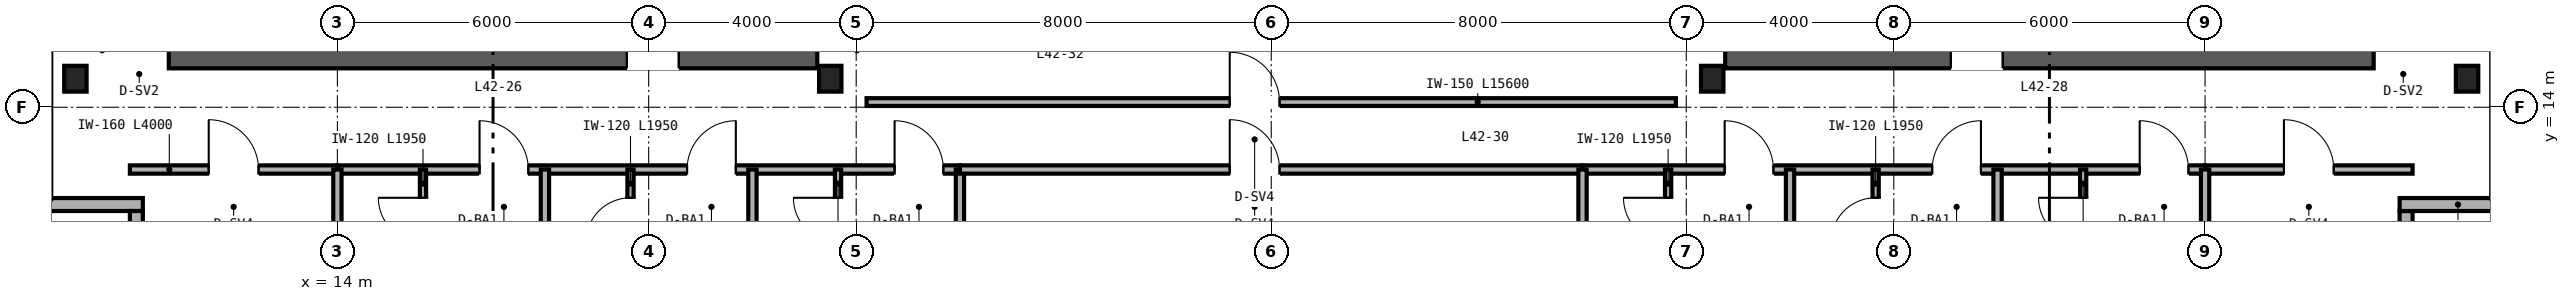
"""IFC4 building model, lengths in metres.
Left out: names, types, materials, properties, quantities, classifications, styles, units other than length and angle.
Written with IfcOpenShell. Run it as: python <this file> out.ifc"""

import sys

from ifc_helpers import new_model, si_unit, direction, frame, frame_2d, origin, origin_2d, place, context, subcontext, project, spatial, rectangle, i_section, extrude, source, transform, mapped, element, fill, save


model = new_model("IFC4")
c1 = context("Model", 3, precision=1e-05, world=origin(), true_north=direction((0.0, 1.0)))
c2 = subcontext(c1, "Body", "Model", "MODEL_VIEW")
j1 = project(units=[si_unit("LENGTHUNIT", "METRE"), si_unit("PLANEANGLEUNIT", "RADIAN")], contexts=[c1])
p1 = place(None, origin())
s1 = spatial("IfcSite", under=j1, at=p1, CompositionType="ELEMENT")
p2 = place(p1, origin())
s2 = spatial("IfcBuilding", under=s1, at=p2, CompositionType="ELEMENT")
p3 = place(p2, frame((0.0, 0.0, 170.4)))
s3 = spatial("IfcBuildingStorey", under=s2, at=p3, CompositionType="ELEMENT", Elevation=170.4)
p4 = place(p3, frame((10.75, 15.0, 0.0), z_axis=(0.0, 0.0, 1.0), x_axis=(1.0, 0.0, 0.0)))
e1 = element("IfcWall", 1, at=p4, inside=s3, PredefinedType="SHEAR", context=c2, shape_type="SweptSolid", body=[
    extrude(rectangle(XDim=12.5, YDim=0.5, at=frame_2d((6.25, 0.0))), origin(), (0.0, 0.0, 1.0), 3.37),
])
p5 = place(p4, frame((8.83, 0.0, 0.0)))
e2 = element("IfcOpeningElement", 2, at=p5, cuts=e1, PredefinedType="OPENING", context=c2, shape_type="SweptSolid", body=[
    extrude(rectangle(XDim=1.0, YDim=2.15, at=frame_2d((0.5, 1.075))), frame((0.0, 0.26, 0.0), z_axis=(0.0, -1.0, 0.0), x_axis=(1.0, 0.0, 0.0)), (0.0, 0.0, 1.0), 0.52),
])
p6 = place(p3, frame((40.75, 15.0, 0.0), z_axis=(0.0, 0.0, 1.0), x_axis=(1.0, 0.0, 0.0)))
e3 = element("IfcWall", 3, at=p6, inside=s3, PredefinedType="SHEAR", context=c2, shape_type="SweptSolid", body=[
    extrude(rectangle(XDim=12.5, YDim=0.5, at=frame_2d((6.25, 0.0))), origin(), (0.0, 0.0, 1.0), 3.37),
])
p7 = place(p6, frame((4.35, 0.0, 0.0)))
e4 = element("IfcOpeningElement", 4, at=p7, cuts=e3, PredefinedType="OPENING", context=c2, shape_type="SweptSolid", body=[
    extrude(rectangle(XDim=1.0, YDim=2.15, at=frame_2d((0.5, 1.075))), frame((0.0, 0.26, 0.0), z_axis=(0.0, -1.0, 0.0), x_axis=(1.0, 0.0, 0.0)), (0.0, 0.0, 1.0), 0.52),
])
m1 = source(origin(), c2, "Body", "SweptSolid", [
    extrude(i_section(OverallWidth=0.432, OverallDepth=0.498, WebThickness=0.056, FlangeThickness=0.089, FilletRadius=0.025, at=origin_2d()), origin(), (0.0, 0.0, 1.0), 3.37),
])
for number, where, z_axis, x_axis in (
    (5, (8.95, 14.55, 0.0), (0.0, 0.0, 1.0), (1.0, 0.0, 0.0)),
    (6, (23.5, 14.55, 0.0), (0.0, 0.0, 1.0), (1.0, 0.0, 0.0)),
    (7, (40.5, 14.55, 0.0), (0.0, 0.0, 1.0), (1.0, 0.0, 0.0)),
    (8, (55.05, 14.55, 0.0), (0.0, 0.0, 1.0), (1.0, 0.0, 0.0)),
):
    element("IfcColumn", number, at=place(p3, frame(where, z_axis=z_axis, x_axis=x_axis)), inside=s3, PredefinedType="COLUMN", context=c2, shape_type="MappedRepresentation", body=[
        mapped(m1, transform((0.0, 0.0, 0.0), scale=1.0)),
    ])
p8 = place(p3, frame((53.875, 10.0, 0.0), z_axis=(0.0, 0.0, 1.0), x_axis=(0.0, 1.0, 0.0)))
e9 = element("IfcWall", 9, at=p8, inside=s3, PredefinedType="SOLIDWALL", context=c2, shape_type="SweptSolid", body=[
    extrude(rectangle(XDim=2.0, YDim=0.25, at=frame_2d((1.0, 0.0))), origin(), (0.0, 0.0, 1.0), 3.37),
])
for number, where, z_axis, x_axis in (
    (10, (53.75, 12.125, 0.0), (0.0, 0.0, 1.0), (1.0, 0.0, 0.0)),
    (11, (8.0, 12.125, 0.0), (0.0, 0.0, 1.0), (1.0, 0.0, 0.0)),
):
    element("IfcWall", number, at=place(p3, frame(where, z_axis=z_axis, x_axis=x_axis)), inside=s3, PredefinedType="SOLIDWALL", context=c2, shape_type="SweptSolid", body=[
        extrude(rectangle(XDim=2.25, YDim=0.25, at=frame_2d((1.125, 0.0))), origin(), (0.0, 0.0, 1.0), 3.37),
    ])
p9 = place(p3, frame((10.125, 12.0, 0.0), z_axis=(0.0, 0.0, 1.0), x_axis=(0.0, -1.0, 0.0)))
e12 = element("IfcWall", 12, at=p9, inside=s3, PredefinedType="SOLIDWALL", context=c2, shape_type="SweptSolid", body=[
    extrude(rectangle(XDim=2.0, YDim=0.25, at=frame_2d((1.0, 0.0))), origin(), (0.0, 0.0, 1.0), 3.37),
])
p10 = place(p3, frame((24.2, 14.1, 0.0), z_axis=(0.0, 0.0, 1.0), x_axis=(1.0, 0.0, 0.0)))
e13 = element("IfcWall", 13, at=p10, inside=s3, PredefinedType="PARTITIONING", context=c2, shape_type="SweptSolid", body=[
    extrude(rectangle(XDim=15.6, YDim=0.15, at=frame_2d((7.8, 0.0))), origin(), (0.0, 0.0, 1.0), 3.37),
])
p11 = place(p10, frame((7.0, 0.0, 0.0)))
e14 = element("IfcOpeningElement", 14, at=p11, cuts=e13, PredefinedType="OPENING", context=c2, shape_type="SweptSolid", body=[
    extrude(rectangle(XDim=0.96, YDim=2.15, at=frame_2d((0.48, 1.075))), frame((0.0, 0.085, 0.0), z_axis=(0.0, -1.0, 0.0), x_axis=(1.0, 0.0, 0.0)), (0.0, 0.0, 1.0), 0.17),
])
p12 = place(p3, frame((10.0, 12.8, 0.0), z_axis=(0.0, 0.0, 1.0), x_axis=(1.0, 0.0, 0.0)))
e15 = element("IfcWall", 15, at=p12, inside=s3, PredefinedType="PARTITIONING", context=c2, shape_type="SweptSolid", body=[
    extrude(rectangle(XDim=4.0, YDim=0.16, at=frame_2d((2.0, 0.0))), origin(), (0.0, 0.0, 1.0), 3.37),
])
p13 = place(p12, frame((1.52, 0.0, 0.0)))
e16 = element("IfcOpeningElement", 16, at=p13, cuts=e15, PredefinedType="OPENING", context=c2, shape_type="SweptSolid", body=[
    extrude(rectangle(XDim=0.96, YDim=2.15, at=frame_2d((0.48, 1.075))), frame((0.0, 0.09, 0.0), z_axis=(0.0, -1.0, 0.0), x_axis=(1.0, 0.0, 0.0)), (0.0, 0.0, 1.0), 0.18),
])
p14 = place(p3, frame((50.0, 12.8, 0.0), z_axis=(0.0, 0.0, 1.0), x_axis=(1.0, 0.0, 0.0)))
e17 = element("IfcWall", 17, at=p14, inside=s3, PredefinedType="PARTITIONING", context=c2, shape_type="SweptSolid", body=[
    extrude(rectangle(XDim=4.0, YDim=0.16, at=frame_2d((2.0, 0.0))), origin(), (0.0, 0.0, 1.0), 3.37),
])
p15 = place(p14, frame((1.52, 0.0, 0.0)))
e18 = element("IfcOpeningElement", 18, at=p15, cuts=e17, PredefinedType="OPENING", context=c2, shape_type="SweptSolid", body=[
    extrude(rectangle(XDim=0.96, YDim=2.15, at=frame_2d((0.48, 1.075))), frame((0.0, 0.09, 0.0), z_axis=(0.0, -1.0, 0.0), x_axis=(1.0, 0.0, 0.0)), (0.0, 0.0, 1.0), 0.18),
])
p16 = place(p3, frame((14.0, 12.8, 0.0), z_axis=(0.0, 0.0, 1.0), x_axis=(1.0, 0.0, 0.0)))
e19 = element("IfcWall", 19, at=p16, inside=s3, PredefinedType="PARTITIONING", context=c2, shape_type="SweptSolid", body=[
    extrude(rectangle(XDim=12.0, YDim=0.16, at=frame_2d((6.0, 0.0))), origin(), (0.0, 0.0, 1.0), 2.913),
])
p17 = place(p16, frame((2.74, 0.0, 0.0)))
e20 = element("IfcOpeningElement", 20, at=p17, cuts=e19, PredefinedType="OPENING", context=c2, shape_type="SweptSolid", body=[
    extrude(rectangle(XDim=0.94, YDim=2.15, at=frame_2d((0.47, 1.075))), frame((0.0, 0.09, 0.0), z_axis=(0.0, -1.0, 0.0), x_axis=(1.0, 0.0, 0.0)), (0.0, 0.0, 1.0), 0.18),
])
p18 = place(p16, frame((6.74, 0.0, 0.0)))
e21 = element("IfcOpeningElement", 21, at=p18, cuts=e19, PredefinedType="OPENING", context=c2, shape_type="SweptSolid", body=[
    extrude(rectangle(XDim=0.94, YDim=2.15, at=frame_2d((0.47, 1.075))), frame((0.0, 0.09, 0.0), z_axis=(0.0, -1.0, 0.0), x_axis=(1.0, 0.0, 0.0)), (0.0, 0.0, 1.0), 0.18),
])
p19 = place(p16, frame((10.74, 0.0, 0.0)))
e22 = element("IfcOpeningElement", 22, at=p19, cuts=e19, PredefinedType="OPENING", context=c2, shape_type="SweptSolid", body=[
    extrude(rectangle(XDim=0.94, YDim=2.15, at=frame_2d((0.47, 1.075))), frame((0.0, 0.09, 0.0), z_axis=(0.0, -1.0, 0.0), x_axis=(1.0, 0.0, 0.0)), (0.0, 0.0, 1.0), 0.18),
])
p20 = place(p3, frame((14.0, 6.36, 0.0), z_axis=(0.0, 0.0, 1.0), x_axis=(0.0, 1.0, 0.0)))
e23 = element("IfcWall", 23, at=p20, inside=s3, PredefinedType="PARTITIONING", context=c2, shape_type="SweptSolid", body=[
    extrude(rectangle(XDim=6.44, YDim=0.16, at=frame_2d((3.22, 0.0))), origin(), (0.0, 0.0, 1.0), 2.677),
])
p21 = place(p3, frame((26.0, 6.36, 0.0), z_axis=(0.0, 0.0, 1.0), x_axis=(0.0, 1.0, 0.0)))
e24 = element("IfcWall", 24, at=p21, inside=s3, PredefinedType="PARTITIONING", context=c2, shape_type="SweptSolid", body=[
    extrude(rectangle(XDim=6.44, YDim=0.16, at=frame_2d((3.22, 0.0))), origin(), (0.0, 0.0, 1.0), 2.443),
])
p22 = place(p3, frame((18.0, 6.36, 0.0), z_axis=(0.0, 0.0, 1.0), x_axis=(0.0, 1.0, 0.0)))
e25 = element("IfcWall", 25, at=p22, inside=s3, PredefinedType="PARTITIONING", context=c2, shape_type="SweptSolid", body=[
    extrude(rectangle(XDim=6.44, YDim=0.16, at=frame_2d((3.22, 0.0))), origin(), (0.0, 0.0, 1.0), 2.677),
])
p23 = place(p3, frame((15.65, 10.85, 0.0), z_axis=(0.0, 0.0, 1.0), x_axis=(0.0, 1.0, 0.0)))
e26 = element("IfcWall", 26, at=p23, inside=s3, PredefinedType="PARTITIONING", context=c2, shape_type="SweptSolid", body=[
    extrude(rectangle(XDim=1.95, YDim=0.12, at=frame_2d((0.975, 0.0))), origin(), (0.0, 0.0, 1.0), 3.37),
])
p24 = place(p23, frame((0.545, 0.0, 0.0)))
e27 = element("IfcOpeningElement", 27, at=p24, cuts=e26, PredefinedType="OPENING", context=c2, shape_type="SweptSolid", body=[
    extrude(rectangle(XDim=0.86, YDim=2.1, at=frame_2d((0.43, 1.05))), frame((0.0, 0.07, 0.0), z_axis=(0.0, -1.0, 0.0), x_axis=(1.0, 0.0, 0.0)), (0.0, 0.0, 1.0), 0.14),
])
p25 = place(p3, frame((22.0, 6.36, 0.0), z_axis=(0.0, 0.0, 1.0), x_axis=(0.0, 1.0, 0.0)))
e28 = element("IfcWall", 28, at=p25, inside=s3, PredefinedType="PARTITIONING", context=c2, shape_type="SweptSolid", body=[
    extrude(rectangle(XDim=6.44, YDim=0.16, at=frame_2d((3.22, 0.0))), origin(), (0.0, 0.0, 1.0), 2.833),
])
p26 = place(p3, frame((19.65, 10.85, 0.0), z_axis=(0.0, 0.0, 1.0), x_axis=(0.0, 1.0, 0.0)))
e29 = element("IfcWall", 29, at=p26, inside=s3, PredefinedType="PARTITIONING", context=c2, shape_type="SweptSolid", body=[
    extrude(rectangle(XDim=1.95, YDim=0.12, at=frame_2d((0.975, 0.0))), origin(), (0.0, 0.0, 1.0), 3.37),
])
p27 = place(p26, frame((0.545, 0.0, 0.0)))
e30 = element("IfcOpeningElement", 30, at=p27, cuts=e29, PredefinedType="OPENING", context=c2, shape_type="SweptSolid", body=[
    extrude(rectangle(XDim=0.86, YDim=2.1, at=frame_2d((0.43, 1.05))), frame((0.0, 0.07, 0.0), z_axis=(0.0, -1.0, 0.0), x_axis=(1.0, 0.0, 0.0)), (0.0, 0.0, 1.0), 0.14),
])
p28 = place(p3, frame((23.65, 10.85, 0.0), z_axis=(0.0, 0.0, 1.0), x_axis=(0.0, 1.0, 0.0)))
e31 = element("IfcWall", 31, at=p28, inside=s3, PredefinedType="PARTITIONING", context=c2, shape_type="SweptSolid", body=[
    extrude(rectangle(XDim=1.95, YDim=0.12, at=frame_2d((0.975, 0.0))), origin(), (0.0, 0.0, 1.0), 2.913),
])
p29 = place(p28, frame((0.545, 0.0, 0.0)))
e32 = element("IfcOpeningElement", 32, at=p29, cuts=e31, PredefinedType="OPENING", context=c2, shape_type="SweptSolid", body=[
    extrude(rectangle(XDim=0.86, YDim=2.1, at=frame_2d((0.43, 1.05))), frame((0.0, 0.07, 0.0), z_axis=(0.0, -1.0, 0.0), x_axis=(1.0, 0.0, 0.0)), (0.0, 0.0, 1.0), 0.14),
])
p30 = place(p3, frame((26.0, 12.8, 0.0), z_axis=(0.0, 0.0, 1.0), x_axis=(1.0, 0.0, 0.0)))
e33 = element("IfcWall", 33, at=p30, inside=s3, PredefinedType="PARTITIONING", context=c2, shape_type="SweptSolid", body=[
    extrude(rectangle(XDim=12.0, YDim=0.16, at=frame_2d((6.0, 0.0))), origin(), (0.0, 0.0, 1.0), 3.37),
])
p31 = place(p30, frame((5.2, 0.0, 0.0)))
e34 = element("IfcOpeningElement", 34, at=p31, cuts=e33, PredefinedType="OPENING", context=c2, shape_type="SweptSolid", body=[
    extrude(rectangle(XDim=0.96, YDim=2.15, at=frame_2d((0.48, 1.075))), frame((0.0, 0.09, 0.0), z_axis=(0.0, -1.0, 0.0), x_axis=(1.0, 0.0, 0.0)), (0.0, 0.0, 1.0), 0.18),
])
p32 = place(p3, frame((38.0, 12.8, 0.0), z_axis=(0.0, 0.0, 1.0), x_axis=(1.0, 0.0, 0.0)))
e35 = element("IfcWall", 35, at=p32, inside=s3, PredefinedType="PARTITIONING", context=c2, shape_type="SweptSolid", body=[
    extrude(rectangle(XDim=12.0, YDim=0.16, at=frame_2d((6.0, 0.0))), origin(), (0.0, 0.0, 1.0), 2.913),
])
p33 = place(p32, frame((2.74, 0.0, 0.0)))
e36 = element("IfcOpeningElement", 36, at=p33, cuts=e35, PredefinedType="OPENING", context=c2, shape_type="SweptSolid", body=[
    extrude(rectangle(XDim=0.94, YDim=2.15, at=frame_2d((0.47, 1.075))), frame((0.0, 0.09, 0.0), z_axis=(0.0, -1.0, 0.0), x_axis=(1.0, 0.0, 0.0)), (0.0, 0.0, 1.0), 0.18),
])
p34 = place(p32, frame((6.74, 0.0, 0.0)))
e37 = element("IfcOpeningElement", 37, at=p34, cuts=e35, PredefinedType="OPENING", context=c2, shape_type="SweptSolid", body=[
    extrude(rectangle(XDim=0.94, YDim=2.15, at=frame_2d((0.47, 1.075))), frame((0.0, 0.09, 0.0), z_axis=(0.0, -1.0, 0.0), x_axis=(1.0, 0.0, 0.0)), (0.0, 0.0, 1.0), 0.18),
])
p35 = place(p32, frame((10.74, 0.0, 0.0)))
e38 = element("IfcOpeningElement", 38, at=p35, cuts=e35, PredefinedType="OPENING", context=c2, shape_type="SweptSolid", body=[
    extrude(rectangle(XDim=0.94, YDim=2.15, at=frame_2d((0.47, 1.075))), frame((0.0, 0.09, 0.0), z_axis=(0.0, -1.0, 0.0), x_axis=(1.0, 0.0, 0.0)), (0.0, 0.0, 1.0), 0.18),
])
p36 = place(p3, frame((38.0, 6.36, 0.0), z_axis=(0.0, 0.0, 1.0), x_axis=(0.0, 1.0, 0.0)))
e39 = element("IfcWall", 39, at=p36, inside=s3, PredefinedType="PARTITIONING", context=c2, shape_type="SweptSolid", body=[
    extrude(rectangle(XDim=6.44, YDim=0.16, at=frame_2d((3.22, 0.0))), origin(), (0.0, 0.0, 1.0), 2.443),
])
p37 = place(p3, frame((50.0, 6.36, 0.0), z_axis=(0.0, 0.0, 1.0), x_axis=(0.0, 1.0, 0.0)))
e40 = element("IfcWall", 40, at=p37, inside=s3, PredefinedType="PARTITIONING", context=c2, shape_type="SweptSolid", body=[
    extrude(rectangle(XDim=6.44, YDim=0.16, at=frame_2d((3.22, 0.0))), origin(), (0.0, 0.0, 1.0), 2.677),
])
p38 = place(p3, frame((42.0, 6.36, 0.0), z_axis=(0.0, 0.0, 1.0), x_axis=(0.0, 1.0, 0.0)))
e41 = element("IfcWall", 41, at=p38, inside=s3, PredefinedType="PARTITIONING", context=c2, shape_type="SweptSolid", body=[
    extrude(rectangle(XDim=6.44, YDim=0.16, at=frame_2d((3.22, 0.0))), origin(), (0.0, 0.0, 1.0), 2.833),
])
p39 = place(p3, frame((39.65, 10.85, 0.0), z_axis=(0.0, 0.0, 1.0), x_axis=(0.0, 1.0, 0.0)))
e42 = element("IfcWall", 42, at=p39, inside=s3, PredefinedType="PARTITIONING", context=c2, shape_type="SweptSolid", body=[
    extrude(rectangle(XDim=1.95, YDim=0.12, at=frame_2d((0.975, 0.0))), origin(), (0.0, 0.0, 1.0), 3.37),
])
p40 = place(p39, frame((0.545, 0.0, 0.0)))
e43 = element("IfcOpeningElement", 43, at=p40, cuts=e42, PredefinedType="OPENING", context=c2, shape_type="SweptSolid", body=[
    extrude(rectangle(XDim=0.86, YDim=2.1, at=frame_2d((0.43, 1.05))), frame((0.0, 0.07, 0.0), z_axis=(0.0, -1.0, 0.0), x_axis=(1.0, 0.0, 0.0)), (0.0, 0.0, 1.0), 0.14),
])
p41 = place(p3, frame((46.0, 6.36, 0.0), z_axis=(0.0, 0.0, 1.0), x_axis=(0.0, 1.0, 0.0)))
e44 = element("IfcWall", 44, at=p41, inside=s3, PredefinedType="PARTITIONING", context=c2, shape_type="SweptSolid", body=[
    extrude(rectangle(XDim=6.44, YDim=0.16, at=frame_2d((3.22, 0.0))), origin(), (0.0, 0.0, 1.0), 2.677),
])
p42 = place(p3, frame((43.65, 10.85, 0.0), z_axis=(0.0, 0.0, 1.0), x_axis=(0.0, 1.0, 0.0)))
e45 = element("IfcWall", 45, at=p42, inside=s3, PredefinedType="PARTITIONING", context=c2, shape_type="SweptSolid", body=[
    extrude(rectangle(XDim=1.95, YDim=0.12, at=frame_2d((0.975, 0.0))), origin(), (0.0, 0.0, 1.0), 3.37),
])
p43 = place(p42, frame((0.545, 0.0, 0.0)))
e46 = element("IfcOpeningElement", 46, at=p43, cuts=e45, PredefinedType="OPENING", context=c2, shape_type="SweptSolid", body=[
    extrude(rectangle(XDim=0.86, YDim=2.1, at=frame_2d((0.43, 1.05))), frame((0.0, 0.07, 0.0), z_axis=(0.0, -1.0, 0.0), x_axis=(1.0, 0.0, 0.0)), (0.0, 0.0, 1.0), 0.14),
])
p44 = place(p3, frame((47.65, 10.85, 0.0), z_axis=(0.0, 0.0, 1.0), x_axis=(0.0, 1.0, 0.0)))
e47 = element("IfcWall", 47, at=p44, inside=s3, PredefinedType="PARTITIONING", context=c2, shape_type="SweptSolid", body=[
    extrude(rectangle(XDim=1.95, YDim=0.12, at=frame_2d((0.975, 0.0))), origin(), (0.0, 0.0, 1.0), 3.37),
])
p45 = place(p44, frame((0.545, 0.0, 0.0)))
e48 = element("IfcOpeningElement", 48, at=p45, cuts=e47, PredefinedType="OPENING", context=c2, shape_type="SweptSolid", body=[
    extrude(rectangle(XDim=0.86, YDim=2.1, at=frame_2d((0.43, 1.05))), frame((0.0, 0.07, 0.0), z_axis=(0.0, -1.0, 0.0), x_axis=(1.0, 0.0, 0.0)), (0.0, 0.0, 1.0), 0.14),
])
m2 = source(origin(), c2, "Body", "SweptSolid", [
    extrude(rectangle(XDim=1.0, YDim=2.15, at=frame_2d((0.5, 1.075))), frame((0.0, 0.025, 0.0), z_axis=(0.0, -1.0, 0.0), x_axis=(1.0, 0.0, 0.0)), (0.0, 0.0, 1.0), 0.05),
])
p46 = place(p5, origin())
e49 = element("IfcDoor", 49, at=p46, inside=s3, OperationType="SINGLE_SWING_LEFT", PredefinedType="DOOR", context=c2, shape_type="MappedRepresentation", body=[
    mapped(m2, transform((0.0, 0.0, 0.0), scale=1.0)),
])
fill(e2, e49)
p47 = place(p7, origin())
e50 = element("IfcDoor", 50, at=p47, inside=s3, OperationType="SINGLE_SWING_RIGHT", PredefinedType="DOOR", context=c2, shape_type="MappedRepresentation", body=[
    mapped(m2, transform((0.0, 0.0, 0.0), scale=1.0)),
])
fill(e4, e50)
m3 = source(origin(), c2, "Body", "SweptSolid", [
    extrude(rectangle(XDim=0.96, YDim=2.15, at=frame_2d((0.48, 1.075))), frame((0.0, 0.025, 0.0), z_axis=(0.0, -1.0, 0.0), x_axis=(1.0, 0.0, 0.0)), (0.0, 0.0, 1.0), 0.05),
])
p48 = place(p11, origin())
e51 = element("IfcDoor", 51, at=p48, inside=s3, OperationType="SINGLE_SWING_LEFT", PredefinedType="DOOR", context=c2, shape_type="MappedRepresentation", body=[
    mapped(m3, transform((0.0, 0.0, 0.0), scale=1.0)),
])
fill(e14, e51)
p49 = place(p13, origin())
e52 = element("IfcDoor", 52, at=p49, inside=s3, OperationType="SINGLE_SWING_LEFT", PredefinedType="DOOR", context=c2, shape_type="MappedRepresentation", body=[
    mapped(m3, transform((0.0, 0.0, 0.0), scale=1.0)),
])
fill(e16, e52)
p50 = place(p15, origin())
e53 = element("IfcDoor", 53, at=p50, inside=s3, OperationType="SINGLE_SWING_LEFT", PredefinedType="DOOR", context=c2, shape_type="MappedRepresentation", body=[
    mapped(m3, transform((0.0, 0.0, 0.0), scale=1.0)),
])
fill(e18, e53)
m4 = source(origin(), c2, "Body", "SweptSolid", [
    extrude(rectangle(XDim=0.86, YDim=2.1, at=frame_2d((0.43, 1.05))), frame((0.0, 0.025, 0.0), z_axis=(0.0, -1.0, 0.0), x_axis=(1.0, 0.0, 0.0)), (0.0, 0.0, 1.0), 0.05),
])
p51 = place(p24, origin())
e54 = element("IfcDoor", 54, at=p51, inside=s3, OperationType="SINGLE_SWING_RIGHT", PredefinedType="DOOR", context=c2, shape_type="MappedRepresentation", body=[
    mapped(m4, transform((0.0, 0.0, 0.0), scale=1.0)),
])
fill(e27, e54)
p52 = place(p27, origin())
e55 = element("IfcDoor", 55, at=p52, inside=s3, OperationType="SINGLE_SWING_LEFT", PredefinedType="DOOR", context=c2, shape_type="MappedRepresentation", body=[
    mapped(m4, transform((0.0, 0.0, 0.0), scale=1.0)),
])
fill(e30, e55)
p53 = place(p29, origin())
e56 = element("IfcDoor", 56, at=p53, inside=s3, OperationType="SINGLE_SWING_RIGHT", PredefinedType="DOOR", context=c2, shape_type="MappedRepresentation", body=[
    mapped(m4, transform((0.0, 0.0, 0.0), scale=1.0)),
])
fill(e32, e56)
m5 = source(origin(), c2, "Body", "SweptSolid", [
    extrude(rectangle(XDim=0.94, YDim=2.15, at=frame_2d((0.47, 1.075))), frame((0.0, 0.025, 0.0), z_axis=(0.0, -1.0, 0.0), x_axis=(1.0, 0.0, 0.0)), (0.0, 0.0, 1.0), 0.05),
])
p54 = place(p17, origin())
e57 = element("IfcDoor", 57, at=p54, inside=s3, OperationType="SINGLE_SWING_LEFT", PredefinedType="DOOR", context=c2, shape_type="MappedRepresentation", body=[
    mapped(m5, transform((0.0, 0.0, 0.0), scale=1.0)),
])
fill(e20, e57)
p55 = place(p18, origin())
e58 = element("IfcDoor", 58, at=p55, inside=s3, OperationType="SINGLE_SWING_RIGHT", PredefinedType="DOOR", context=c2, shape_type="MappedRepresentation", body=[
    mapped(m5, transform((0.0, 0.0, 0.0), scale=1.0)),
])
fill(e21, e58)
p56 = place(p19, origin())
e59 = element("IfcDoor", 59, at=p56, inside=s3, OperationType="SINGLE_SWING_LEFT", PredefinedType="DOOR", context=c2, shape_type="MappedRepresentation", body=[
    mapped(m5, transform((0.0, 0.0, 0.0), scale=1.0)),
])
fill(e22, e59)
p57 = place(p31, origin())
e60 = element("IfcDoor", 60, at=p57, inside=s3, OperationType="SINGLE_SWING_LEFT", PredefinedType="DOOR", context=c2, shape_type="MappedRepresentation", body=[
    mapped(m3, transform((0.0, 0.0, 0.0), scale=1.0)),
])
fill(e34, e60)
p58 = place(p40, origin())
e61 = element("IfcDoor", 61, at=p58, inside=s3, OperationType="SINGLE_SWING_RIGHT", PredefinedType="DOOR", context=c2, shape_type="MappedRepresentation", body=[
    mapped(m4, transform((0.0, 0.0, 0.0), scale=1.0)),
])
fill(e43, e61)
p59 = place(p43, origin())
e62 = element("IfcDoor", 62, at=p59, inside=s3, OperationType="SINGLE_SWING_LEFT", PredefinedType="DOOR", context=c2, shape_type="MappedRepresentation", body=[
    mapped(m4, transform((0.0, 0.0, 0.0), scale=1.0)),
])
fill(e46, e62)
p60 = place(p45, origin())
e63 = element("IfcDoor", 63, at=p60, inside=s3, OperationType="SINGLE_SWING_RIGHT", PredefinedType="DOOR", context=c2, shape_type="MappedRepresentation", body=[
    mapped(m4, transform((0.0, 0.0, 0.0), scale=1.0)),
])
fill(e48, e63)
p61 = place(p33, origin())
e64 = element("IfcDoor", 64, at=p61, inside=s3, OperationType="SINGLE_SWING_LEFT", PredefinedType="DOOR", context=c2, shape_type="MappedRepresentation", body=[
    mapped(m5, transform((0.0, 0.0, 0.0), scale=1.0)),
])
fill(e36, e64)
p62 = place(p34, origin())
e65 = element("IfcDoor", 65, at=p62, inside=s3, OperationType="SINGLE_SWING_RIGHT", PredefinedType="DOOR", context=c2, shape_type="MappedRepresentation", body=[
    mapped(m5, transform((0.0, 0.0, 0.0), scale=1.0)),
])
fill(e37, e65)
p63 = place(p35, origin())
e66 = element("IfcDoor", 66, at=p63, inside=s3, OperationType="SINGLE_SWING_LEFT", PredefinedType="DOOR", context=c2, shape_type="MappedRepresentation", body=[
    mapped(m5, transform((0.0, 0.0, 0.0), scale=1.0)),
])
fill(e38, e66)
save(model, sys.argv[1])
